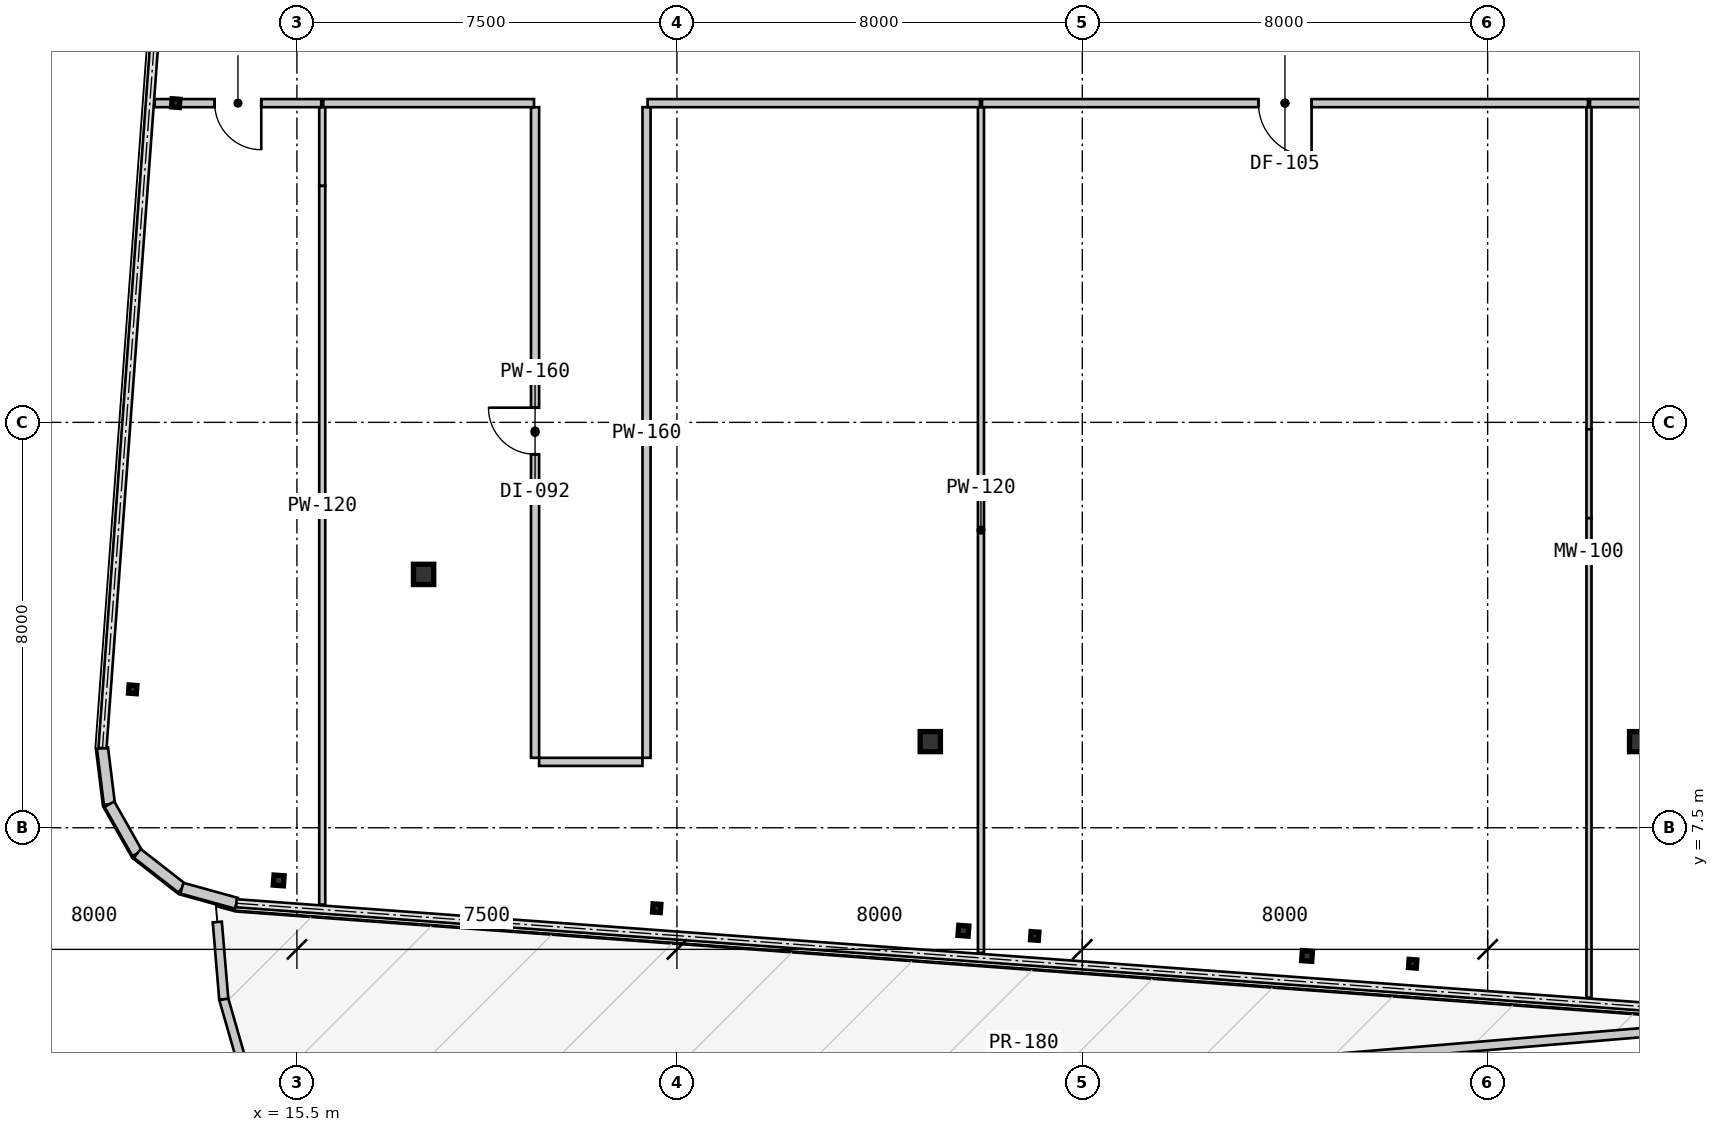
"""IFC4 building model, lengths in metres.
Left out: names, types, materials, properties, quantities, classifications, styles, units other than length and angle.
Written with IfcOpenShell. Run it as: python <this file> out.ifc"""

import sys

from ifc_helpers import new_model, si_unit, direction, frame, frame_2d, origin, origin_2d, place, context, subcontext, project, spatial, rectangle, hollow_rectangle, i_section, extrude, source, transform, mapped, element, fill, save


model = new_model("IFC4")
c1 = context("Model", 3, precision=1e-05, world=origin(), true_north=direction((0.0, 1.0)))
c2 = subcontext(c1, "Body", "Model", "MODEL_VIEW")
j1 = project(units=[si_unit("LENGTHUNIT", "METRE"), si_unit("PLANEANGLEUNIT", "RADIAN")], contexts=[c1])
p1 = place(None, origin())
s1 = spatial("IfcSite", under=j1, at=p1, CompositionType="ELEMENT")
p2 = place(p1, origin())
s2 = spatial("IfcBuilding", under=s1, at=p2, CompositionType="ELEMENT")
p3 = place(p2, frame((0.0, 0.0, 211.4)))
s3 = spatial("IfcBuildingStorey", under=s2, at=p3, CompositionType="ELEMENT", Elevation=211.4)
m1 = source(origin(), c2, "Body", "SweptSolid", [
    extrude(i_section(OverallWidth=0.4, OverallDepth=0.396, WebThickness=0.022, FlangeThickness=0.034, at=origin_2d()), origin(), (0.0, 0.0, 1.0), 3.15),
])
for number, where, z_axis, x_axis in (
    (1, (28.0, 9.2, 0.0), (0.0, 0.0, 1.0), (1.0, 0.0, 0.0)),
    (2, (42.0, 9.2, 0.0), (0.0, 0.0, 1.0), (1.0, 0.0, 0.0)),
):
    element("IfcColumn", number, at=place(p3, frame(where, z_axis=z_axis, x_axis=x_axis)), inside=s3, PredefinedType="COLUMN", context=c2, shape_type="MappedRepresentation", body=[
        mapped(m1, transform((0.0, 0.0, 0.0), scale=1.0)),
    ])
m2 = source(origin(), c2, "Body", "SweptSolid", [
    extrude(hollow_rectangle(XDim=0.4, YDim=0.4, WallThickness=0.016, at=origin_2d()), origin(), (0.0, 0.0, 1.0), 3.15),
])
p4 = place(p3, frame((18.0, 12.5, 0.0), z_axis=(0.0, 0.0, 1.0), x_axis=(1.0, 0.0, 0.0)))
e3 = element("IfcColumn", 3, at=p4, inside=s3, PredefinedType="COLUMN", context=c2, shape_type="MappedRepresentation", body=[
    mapped(m2, transform((0.0, 0.0, 0.0), scale=1.0)),
])
m3 = source(origin(), c2, "Body", "SweptSolid", [
    extrude(hollow_rectangle(XDim=0.2, YDim=0.2, WallThickness=0.009, at=origin_2d()), origin(), (0.0, 0.0, 1.0), 3.15),
])
p5 = place(p3, frame((15.141, 6.46, 0.0), z_axis=(0.0, 0.0, 1.0), x_axis=(0.997314477224, -0.073238197128, 0.0)))
e4 = element("IfcColumn", 4, at=p5, inside=s3, PredefinedType="COLUMN", context=c2, shape_type="MappedRepresentation", body=[
    mapped(m3, transform((0.0, 0.0, 0.0), scale=1.0)),
])
m4 = source(origin(), c2, "Body", "SweptSolid", [
    extrude(i_section(OverallWidth=0.154, OverallDepth=0.162, WebThickness=0.008, FlangeThickness=0.011, at=origin_2d()), origin(), (0.0, 0.0, 1.0), 3.15),
])
for number, where, z_axis, x_axis in (
    (5, (22.601, 5.912, 0.0), (0.0, 0.0, 1.0), (0.997, -0.073, 0.0)),
    (6, (30.061, 5.365, 0.0), (0.0, 0.0, 1.0), (0.997, -0.073, 0.0)),
    (7, (37.521, 4.817, 0.0), (0.0, 0.0, 1.0), (0.997, -0.073, 0.0)),
    (8, (12.259, 10.231, 0.0), (0.0, 0.0, 1.0), (0.997, -0.073, 0.0)),
    (9, (13.109, 21.8, 0.0), (0.0, 0.0, 1.0), (0.997, -0.073, 0.0)),
):
    element("IfcColumn", number, at=place(p3, frame(where, z_axis=z_axis, x_axis=x_axis)), inside=s3, PredefinedType="COLUMN", context=c2, shape_type="MappedRepresentation", body=[
        mapped(m4, transform((0.0, 0.0, 0.0), scale=1.0)),
    ])
for number, where, z_axis, x_axis in (
    (10, (28.654, 5.468, 0.0), (0.0, 0.0, 1.0), (0.997, -0.073, 0.0)),
    (11, (35.436, 4.97, 0.0), (0.0, 0.0, 1.0), (0.997, -0.073, 0.0)),
):
    element("IfcColumn", number, at=place(p3, frame(where, z_axis=z_axis, x_axis=x_axis)), inside=s3, PredefinedType="COLUMN", context=c2, shape_type="MappedRepresentation", body=[
        mapped(m3, transform((0.0, 0.0, 0.0), scale=1.0)),
    ])
m5 = source(origin(), c2, "Body", "SweptSolid", [
    extrude(rectangle(XDim=1.116, YDim=0.22, at=frame_2d((0.558, 0.0))), origin(), (0.0, 0.0, 1.0), 2.93),
])
for number, where, z_axis, x_axis in (
    (12, (11.663, 9.072, 0.0), (0.0, 0.0, 1.0), (0.123, -0.992, 0.0)),
    (13, (11.8, 7.965, 0.0), (0.0, 0.0, 1.0), (0.493, -0.87, 0.0)),
    (14, (12.35, 6.994, 0.0), (0.0, 0.0, 1.0), (0.789, -0.615, 0.0)),
):
    element("IfcWall", number, at=place(p3, frame(where, z_axis=z_axis, x_axis=x_axis)), inside=s3, PredefinedType="SOLIDWALL", context=c2, shape_type="MappedRepresentation", body=[
        mapped(m5, transform((0.0, 0.0, 0.0), scale=1.0)),
    ])
m6 = source(origin(), c2, "Body", "SweptSolid", [
    extrude(rectangle(XDim=1.116, YDim=0.22, at=frame_2d((0.558, 0.0))), origin(), (0.0, 0.0, 1.0), 2.93),
])
p6 = place(p3, frame((13.23, 6.307, 0.0), z_axis=(0.0, 0.0, 1.0), x_axis=(0.963890028874, -0.266300605026, 0.0)))
e15 = element("IfcWall", 15, at=p6, inside=s3, PredefinedType="SOLIDWALL", context=c2, shape_type="MappedRepresentation", body=[
    mapped(m6, transform((0.0, 0.0, 0.0), scale=1.0)),
])
m7 = source(origin(), c2, "Body", "SweptSolid", [
    extrude(rectangle(XDim=1.171, YDim=0.18, at=frame_2d((0.585, 0.0))), origin(), (0.0, 0.0, 1.0), 1.15),
])
p7 = place(p3, frame((14.38, 2.993, 0.0), z_axis=(0.0, 0.0, 1.0), x_axis=(-0.276345952673, 0.961058226353, 0.0)))
e16 = element("IfcWall", 16, at=p7, inside=s3, PredefinedType="PARAPET", context=c2, shape_type="MappedRepresentation", body=[
    mapped(m7, transform((0.0, 0.0, 0.0), scale=1.0)),
])
m8 = source(origin(), c2, "Body", "SweptSolid", [
    extrude(rectangle(XDim=1.527, YDim=0.18, at=frame_2d((0.764, 0.0))), origin(), (0.0, 0.0, 1.0), 1.15),
])
p8 = place(p3, frame((14.056, 4.118, 0.0), z_axis=(0.0, 0.0, 1.0), x_axis=(-0.083759809087, 0.996485972998, 0.0)))
e17 = element("IfcWall", 17, at=p8, inside=s3, PredefinedType="PARAPET", context=c2, shape_type="MappedRepresentation", body=[
    mapped(m8, transform((0.0, 0.0, 0.0), scale=1.0)),
])
m9 = source(origin(), c2, "Body", "SweptSolid", [
    extrude(rectangle(XDim=25.182, YDim=0.18, at=frame_2d((12.591, 0.0))), origin(), (0.0, 0.0, 1.0), 1.15),
])
p9 = place(p3, frame((42.39, 3.487, 0.0), z_axis=(0.0, 0.0, 1.0), x_axis=(-0.996492802382, -0.083678520547, 0.0)))
e18 = element("IfcWall", 18, at=p9, inside=s3, PredefinedType="PARAPET", context=c2, shape_type="MappedRepresentation", body=[
    mapped(m9, transform((0.0, 0.0, 0.0), scale=1.0)),
])
m10 = source(origin(), c2, "Body", "SweptSolid", [
    extrude(rectangle(XDim=3.286, YDim=0.16, at=frame_2d((1.643, 0.0))), origin(), (0.0, 0.0, 1.0), 2.93),
])
p10 = place(p3, frame((15.98, 21.8, 0.0), z_axis=(0.0, 0.0, 1.0), x_axis=(-1.0, 0.0, 0.0)))
e19 = element("IfcWall", 19, at=p10, inside=s3, PredefinedType="PARTITIONING", context=c2, shape_type="MappedRepresentation", body=[
    mapped(m10, transform((0.0, 0.0, 0.0), scale=1.0)),
])
m11 = source(origin(), c2, "Body", "SweptSolid", [
    extrude(rectangle(XDim=0.92, YDim=2.1, at=frame_2d((0.46, 1.05))), frame((0.0, 0.09, 0.0), z_axis=(0.0, -1.0, 0.0), x_axis=(1.0, 0.0, 0.0)), (0.0, 0.0, 1.0), 0.18),
])
p11 = place(p10, frame((1.183, 0.0, 0.0)))
e20 = element("IfcOpeningElement", 20, at=p11, cuts=e19, PredefinedType="OPENING", context=c2, shape_type="MappedRepresentation", body=[
    mapped(m11, transform((0.0, 0.0, 0.0), scale=1.0)),
])
m12 = source(origin(), c2, "Body", "SweptSolid", [
    extrude(rectangle(XDim=12.84, YDim=0.16, at=frame_2d((6.42, 0.0))), origin(), (0.0, 0.0, 1.0), 2.93),
])
p12 = place(p3, frame((20.2, 8.88, 0.0), z_axis=(0.0, 0.0, 1.0), x_axis=(0.0, 1.0, 0.0)))
e21 = element("IfcWall", 21, at=p12, inside=s3, PredefinedType="PARTITIONING", context=c2, shape_type="MappedRepresentation", body=[
    mapped(m12, transform((0.0, 0.0, 0.0), scale=1.0)),
])
p13 = place(p12, frame((5.99, 0.0, 0.0)))
e22 = element("IfcOpeningElement", 22, at=p13, cuts=e21, PredefinedType="OPENING", context=c2, shape_type="MappedRepresentation", body=[
    mapped(m11, transform((0.0, 0.0, 0.0), scale=1.0)),
])
p14 = place(p3, frame((22.4, 21.72, 0.0), z_axis=(0.0, 0.0, 1.0), x_axis=(0.0, -1.0, 0.0)))
e23 = element("IfcWall", 23, at=p14, inside=s3, PredefinedType="PARTITIONING", context=c2, shape_type="MappedRepresentation", body=[
    mapped(m12, transform((0.0, 0.0, 0.0), scale=1.0)),
])
m13 = source(origin(), c2, "Body", "SweptSolid", [
    extrude(rectangle(XDim=6.559, YDim=0.16, at=frame_2d((3.28, 0.0))), origin(), (0.0, 0.0, 1.0), 2.93),
])
p15 = place(p3, frame((28.98, 21.8, 0.0), z_axis=(0.0, 0.0, 1.0), x_axis=(-1.0, 0.0, 0.0)))
e24 = element("IfcWall", 24, at=p15, inside=s3, PredefinedType="PARTITIONING", context=c2, shape_type="MappedRepresentation", body=[
    mapped(m13, transform((0.0, 0.0, 0.0), scale=1.0)),
])
m14 = source(origin(), c2, "Body", "SweptSolid", [
    extrude(rectangle(XDim=4.159, YDim=0.16, at=frame_2d((2.08, 0.0))), origin(), (0.0, 0.0, 1.0), 2.93),
])
p16 = place(p3, frame((20.18, 21.8, 0.0), z_axis=(0.0, 0.0, 1.0), x_axis=(-1.0, 0.0, 0.0)))
e25 = element("IfcWall", 25, at=p16, inside=s3, PredefinedType="PARTITIONING", context=c2, shape_type="MappedRepresentation", body=[
    mapped(m14, transform((0.0, 0.0, 0.0), scale=1.0)),
])
m15 = source(origin(), c2, "Body", "SweptSolid", [
    extrude(rectangle(XDim=2.04, YDim=0.16, at=frame_2d((1.02, 0.0))), origin(), (0.0, 0.0, 1.0), 2.93),
])
p17 = place(p3, frame((22.32, 8.8, 0.0), z_axis=(0.0, 0.0, 1.0), x_axis=(-1.0, 0.0, 0.0)))
e26 = element("IfcWall", 26, at=p17, inside=s3, PredefinedType="PARTITIONING", context=c2, shape_type="MappedRepresentation", body=[
    mapped(m15, transform((0.0, 0.0, 0.0), scale=1.0)),
])
m16 = source(origin(), c2, "Body", "SweptSolid", [
    extrude(rectangle(XDim=11.959, YDim=0.16, at=frame_2d((5.98, 0.0))), origin(), (0.0, 0.0, 1.0), 2.93),
])
p18 = place(p3, frame((40.98, 21.8, 0.0), z_axis=(0.0, 0.0, 1.0), x_axis=(-1.0, 0.0, 0.0)))
e27 = element("IfcWall", 27, at=p18, inside=s3, PredefinedType="PARTITIONING", context=c2, shape_type="MappedRepresentation", body=[
    mapped(m16, transform((0.0, 0.0, 0.0), scale=1.0)),
])
m17 = source(origin(), c2, "Body", "SweptSolid", [
    extrude(rectangle(XDim=1.05, YDim=2.1, at=frame_2d((0.525, 1.05))), frame((0.0, 0.09, 0.0), z_axis=(0.0, -1.0, 0.0), x_axis=(1.0, 0.0, 0.0)), (0.0, 0.0, 1.0), 0.18),
])
p19 = place(p18, frame((5.455, 0.0, 0.0)))
e28 = element("IfcOpeningElement", 28, at=p19, cuts=e27, PredefinedType="OPENING", context=c2, shape_type="MappedRepresentation", body=[
    mapped(m17, transform((0.0, 0.0, 0.0), scale=1.0)),
])
p20 = place(p3, frame((47.58, 21.8, 0.0), z_axis=(0.0, 0.0, 1.0), x_axis=(-1.0, 0.0, 0.0)))
e29 = element("IfcWall", 29, at=p20, inside=s3, PredefinedType="PARTITIONING", context=c2, shape_type="MappedRepresentation", body=[
    mapped(m13, transform((0.0, 0.0, 0.0), scale=1.0)),
])
m18 = source(origin(), c2, "Body", "SweptSolid", [
    extrude(rectangle(XDim=1.552, YDim=0.12, at=frame_2d((0.776, 0.0))), origin(), (0.0, 0.0, 1.0), 2.397),
])
p21 = place(p3, frame((16.0, 21.718, 0.0), z_axis=(0.0, 0.0, 1.0), x_axis=(0.0, -1.0, 0.0)))
e30 = element("IfcWall", 30, at=p21, inside=s3, PredefinedType="PARTITIONING", context=c2, shape_type="MappedRepresentation", body=[
    mapped(m18, transform((0.0, 0.0, 0.0), scale=1.0)),
])
m19 = source(origin(), c2, "Body", "SweptSolid", [
    extrude(rectangle(XDim=14.183, YDim=0.12, at=frame_2d((7.091, 0.0))), origin(), (0.0, 0.0, 1.0), 2.93),
])
p22 = place(p3, frame((16.0, 20.167, 0.0), z_axis=(0.0, 0.0, 1.0), x_axis=(0.0, -1.0, 0.0)))
e31 = element("IfcWall", 31, at=p22, inside=s3, PredefinedType="PARTITIONING", context=c2, shape_type="MappedRepresentation", body=[
    mapped(m19, transform((0.0, 0.0, 0.0), scale=1.0)),
])
m20 = source(origin(), c2, "Body", "SweptSolid", [
    extrude(rectangle(XDim=16.689, YDim=0.12, at=frame_2d((8.344, 0.0))), origin(), (0.0, 0.0, 1.0), 2.93),
])
p23 = place(p3, frame((29.0, 21.718, 0.0), z_axis=(0.0, 0.0, 1.0), x_axis=(0.0, -1.0, 0.0)))
e32 = element("IfcWall", 32, at=p23, inside=s3, PredefinedType="PARTITIONING", context=c2, shape_type="MappedRepresentation", body=[
    mapped(m20, transform((0.0, 0.0, 0.0), scale=1.0)),
])
m21 = source(origin(), c2, "Body", "SweptSolid", [
    extrude(rectangle(XDim=6.355, YDim=0.1, at=frame_2d((3.177, 0.0))), origin(), (0.0, 0.0, 1.0), 2.93),
])
p24 = place(p3, frame((41.0, 21.718, 0.0), z_axis=(0.0, 0.0, 1.0), x_axis=(0.0, -1.0, 0.0)))
e33 = element("IfcWall", 33, at=p24, inside=s3, PredefinedType="MOVABLE", context=c2, shape_type="MappedRepresentation", body=[
    mapped(m21, transform((0.0, 0.0, 0.0), scale=1.0)),
])
m22 = source(origin(), c2, "Body", "SweptSolid", [
    extrude(rectangle(XDim=1.755, YDim=0.1, at=frame_2d((0.877, 0.0))), origin(), (0.0, 0.0, 1.0), 2.328),
])
p25 = place(p3, frame((41.0, 15.363, 0.0), z_axis=(0.0, 0.0, 1.0), x_axis=(0.0, -1.0, 0.0)))
e34 = element("IfcWall", 34, at=p25, inside=s3, PredefinedType="MOVABLE", context=c2, shape_type="MappedRepresentation", body=[
    mapped(m22, transform((0.0, 0.0, 0.0), scale=1.0)),
])
m23 = source(origin(), c2, "Body", "SweptSolid", [
    extrude(rectangle(XDim=9.46, YDim=0.1, at=frame_2d((4.73, 0.0))), origin(), (0.0, 0.0, 1.0), 2.93),
])
p26 = place(p3, frame((41.0, 13.608, 0.0), z_axis=(0.0, 0.0, 1.0), x_axis=(0.0, -1.0, 0.0)))
e35 = element("IfcWall", 35, at=p26, inside=s3, PredefinedType="MOVABLE", context=c2, shape_type="MappedRepresentation", body=[
    mapped(m23, transform((0.0, 0.0, 0.0), scale=1.0)),
])
m24 = source(origin(), c2, "Body", "SweptSolid", [
    extrude(rectangle(XDim=0.92, YDim=2.1, at=frame_2d((0.46, 1.05))), frame((0.0, 0.025, 0.0), z_axis=(0.0, -1.0, 0.0), x_axis=(1.0, 0.0, 0.0)), (0.0, 0.0, 1.0), 0.05),
])
p27 = place(p11, origin())
e36 = element("IfcDoor", 36, at=p27, inside=s3, OperationType="SINGLE_SWING_LEFT", PredefinedType="DOOR", context=c2, shape_type="MappedRepresentation", body=[
    mapped(m24, transform((0.0, 0.0, 0.0), scale=1.0)),
])
fill(e20, e36)
p28 = place(p13, origin())
e37 = element("IfcDoor", 37, at=p28, inside=s3, OperationType="SINGLE_SWING_RIGHT", PredefinedType="DOOR", context=c2, shape_type="MappedRepresentation", body=[
    mapped(m24, transform((0.0, 0.0, 0.0), scale=1.0)),
])
fill(e22, e37)
m25 = source(origin(), c2, "Body", "SweptSolid", [
    extrude(rectangle(XDim=1.05, YDim=2.1, at=frame_2d((0.525, 1.05))), frame((0.0, 0.025, 0.0), z_axis=(0.0, -1.0, 0.0), x_axis=(1.0, 0.0, 0.0)), (0.0, 0.0, 1.0), 0.05),
])
p29 = place(p19, origin())
e38 = element("IfcDoor", 38, at=p29, inside=s3, OperationType="SINGLE_SWING_LEFT", PredefinedType="DOOR", context=c2, shape_type="MappedRepresentation", body=[
    mapped(m25, transform((0.0, 0.0, 0.0), scale=1.0)),
])
fill(e28, e38)
save(model, sys.argv[1])
